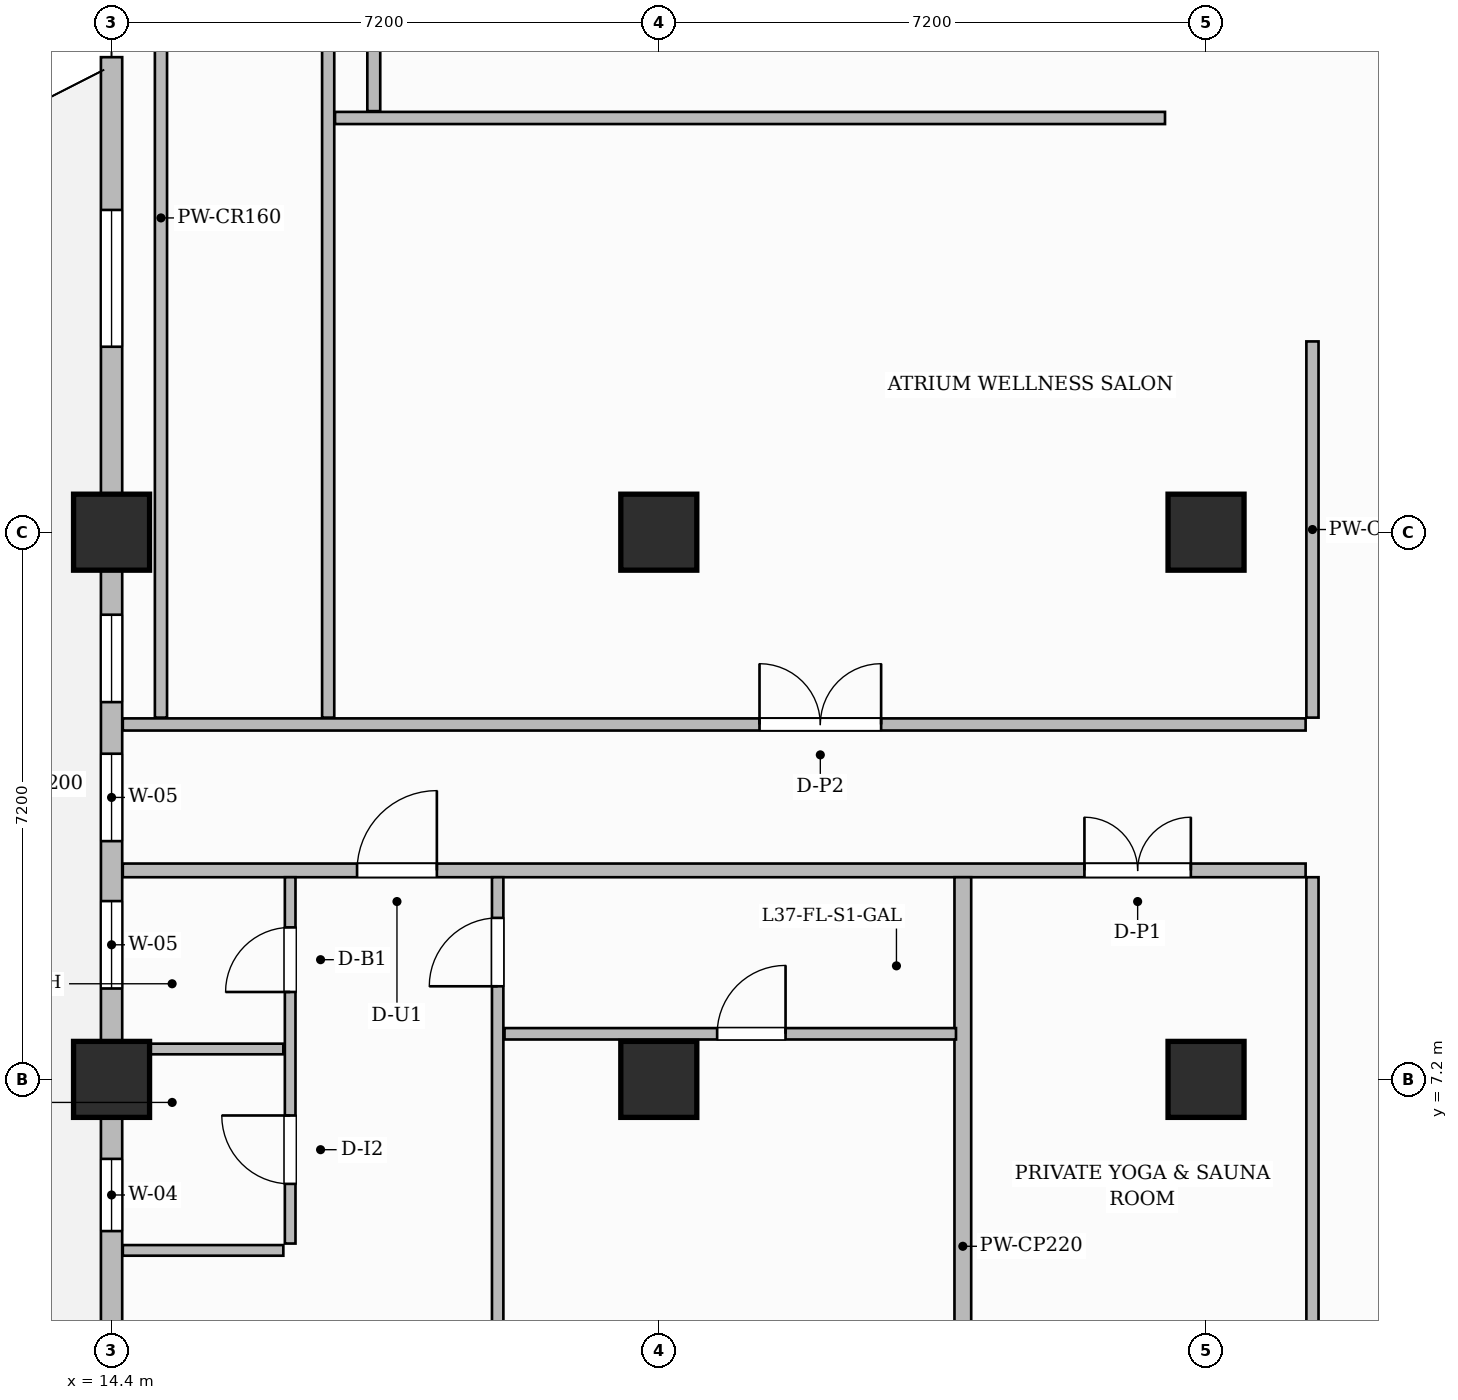
"""IFC4 building model, lengths in metres.
Left out: names, types, materials, properties, quantities, classifications, styles, units other than length and angle.
Written with IfcOpenShell. Run it as: python <this file> out.ifc"""

import sys

from ifc_helpers import new_model, si_unit, direction, frame, frame_2d, origin, origin_2d, place, context, subcontext, project, spatial, rectangle, extrude, source, transform, mapped, element, fill, save


model = new_model("IFC4")
c1 = context("Model", 3, precision=1e-05, world=origin(), true_north=direction((0.0, 1.0)))
c2 = subcontext(c1, "Body", "Model", "MODEL_VIEW")
j1 = project(units=[si_unit("LENGTHUNIT", "METRE"), si_unit("PLANEANGLEUNIT", "RADIAN")], contexts=[c1])
p1 = place(None, origin())
s1 = spatial("IfcSite", under=j1, at=p1, CompositionType="ELEMENT")
p2 = place(p1, origin())
s2 = spatial("IfcBuilding", under=s1, at=p2, CompositionType="ELEMENT")
p3 = place(p2, frame((0.0, 0.0, 150.3)))
s3 = spatial("IfcBuildingStorey", under=s2, at=p3, CompositionType="ELEMENT", Elevation=150.3)
m1 = source(origin(), c2, "Body", "SweptSolid", [
    extrude(rectangle(XDim=1.0, YDim=1.0, at=origin_2d()), origin(), (0.0, 0.0, 1.0), 3.85),
])
for number, where, z_axis, x_axis in (
    (1, (14.4, 7.2, 0.0), (0.0, 0.0, 1.0), (1.0, 0.0, 0.0)),
    (2, (14.4, 14.4, 0.0), (0.0, 0.0, 1.0), (1.0, 0.0, 0.0)),
    (3, (21.6, 7.2, 0.0), (0.0, 0.0, 1.0), (1.0, 0.0, 0.0)),
    (4, (21.6, 14.4, 0.0), (0.0, 0.0, 1.0), (1.0, 0.0, 0.0)),
    (5, (28.8, 7.2, 0.0), (0.0, 0.0, 1.0), (1.0, 0.0, 0.0)),
    (6, (28.8, 14.4, 0.0), (0.0, 0.0, 1.0), (1.0, 0.0, 0.0)),
):
    element("IfcColumn", number, at=place(p3, frame(where, z_axis=z_axis, x_axis=x_axis)), inside=s3, PredefinedType="COLUMN", context=c2, shape_type="MappedRepresentation", body=[
        mapped(m1, transform((0.0, 0.0, 0.0), scale=1.0)),
    ])
p4 = place(p3, frame((14.548, 9.95, 0.0), z_axis=(0.0, 0.0, 1.0), x_axis=(1.0, 0.0, 0.0)))
e7 = element("IfcWall", 7, at=p4, inside=s3, PredefinedType="PARTITIONING", context=c2, shape_type="SweptSolid", body=[
    extrude(rectangle(XDim=15.562, YDim=0.18, at=frame_2d((7.781, 0.0))), origin(), (0.0, 0.0, 1.0), 3.6),
])
p5 = place(p4, frame((3.082, 0.0, 0.0)))
e8 = element("IfcOpeningElement", 8, at=p5, cuts=e7, PredefinedType="OPENING", context=c2, shape_type="SweptSolid", body=[
    extrude(rectangle(XDim=1.05, YDim=2.25, at=frame_2d((0.525, 1.125))), frame((0.0, 0.1, 0.0), z_axis=(0.0, -1.0, 0.0), x_axis=(1.0, 0.0, 0.0)), (0.0, 0.0, 1.0), 0.2),
])
p6 = place(p4, frame((12.652, 0.0, 0.0)))
e9 = element("IfcOpeningElement", 9, at=p6, cuts=e7, PredefinedType="OPENING", context=c2, shape_type="SweptSolid", body=[
    extrude(rectangle(XDim=1.4, YDim=2.35, at=frame_2d((0.7, 1.175))), frame((0.0, 0.1, 0.0), z_axis=(0.0, -1.0, 0.0), x_axis=(1.0, 0.0, 0.0)), (0.0, 0.0, 1.0), 0.2),
])
p7 = place(p3, frame((14.548, 11.87, 0.0), z_axis=(0.0, 0.0, 1.0), x_axis=(1.0, 0.0, 0.0)))
e10 = element("IfcWall", 10, at=p7, inside=s3, PredefinedType="PARTITIONING", context=c2, shape_type="SweptSolid", body=[
    extrude(rectangle(XDim=15.562, YDim=0.16, at=frame_2d((7.781, 0.0))), origin(), (0.0, 0.0, 1.0), 3.6),
])
p8 = place(p7, frame((8.377, 0.0, 0.0)))
e11 = element("IfcOpeningElement", 11, at=p8, cuts=e10, PredefinedType="OPENING", context=c2, shape_type="SweptSolid", body=[
    extrude(rectangle(XDim=1.6, YDim=2.4, at=frame_2d((0.8, 1.2))), frame((0.0, 0.09, 0.0), z_axis=(0.0, -1.0, 0.0), x_axis=(1.0, 0.0, 0.0)), (0.0, 0.0, 1.0), 0.18),
])
p9 = place(p3, frame((30.2, 11.96, 0.0), z_axis=(0.0, 0.0, 1.0), x_axis=(0.0, 1.0, 0.0)))
e12 = element("IfcWall", 12, at=p9, inside=s3, PredefinedType="PARTITIONING", context=c2, shape_type="SweptSolid", body=[
    extrude(rectangle(XDim=4.95, YDim=0.16, at=frame_2d((2.475, 0.0))), origin(), (0.0, 0.0, 1.0), 3.6),
])
p10 = place(p3, frame((30.2, 0.148, 0.0), z_axis=(0.0, 0.0, 1.0), x_axis=(0.0, 1.0, 0.0)))
e13 = element("IfcWall", 13, at=p10, inside=s3, PredefinedType="PARTITIONING", context=c2, shape_type="SweptSolid", body=[
    extrude(rectangle(XDim=9.712, YDim=0.16, at=frame_2d((4.856, 0.0))), origin(), (0.0, 0.0, 1.0), 3.6),
])
p11 = place(p10, frame((1.977, 0.0, 0.0)))
e14 = element("IfcOpeningElement", 14, at=p11, cuts=e13, PredefinedType="OPENING", context=c2, shape_type="SweptSolid", body=[
    extrude(rectangle(XDim=1.05, YDim=2.15, at=frame_2d((0.525, 1.075))), frame((0.0, 0.09, 0.0), z_axis=(0.0, -1.0, 0.0), x_axis=(1.0, 0.0, 0.0)), (0.0, 0.0, 1.0), 0.18),
])
p12 = place(p3, frame((25.6, 0.148, 0.0), z_axis=(0.0, 0.0, 1.0), x_axis=(0.0, 1.0, 0.0)))
e15 = element("IfcWall", 15, at=p12, inside=s3, PredefinedType="PARTITIONING", context=c2, shape_type="SweptSolid", body=[
    extrude(rectangle(XDim=9.712, YDim=0.22, at=frame_2d((4.856, 0.0))), origin(), (0.0, 0.0, 1.0), 3.6),
])
p13 = place(p3, frame((16.75, 5.04, 0.0), z_axis=(0.0, 0.0, 1.0), x_axis=(0.0, 1.0, 0.0)))
e16 = element("IfcWall", 16, at=p13, inside=s3, PredefinedType="PARTITIONING", context=c2, shape_type="SweptSolid", body=[
    extrude(rectangle(XDim=4.82, YDim=0.14, at=frame_2d((2.41, 0.0))), origin(), (0.0, 0.0, 1.0), 3.6),
])
p14 = place(p13, frame((0.785, 0.0, 0.0)))
e17 = element("IfcOpeningElement", 17, at=p14, cuts=e16, PredefinedType="OPENING", context=c2, shape_type="SweptSolid", body=[
    extrude(rectangle(XDim=0.9, YDim=2.15, at=frame_2d((0.45, 1.075))), frame((0.0, 0.08, 0.0), z_axis=(0.0, -1.0, 0.0), x_axis=(1.0, 0.0, 0.0)), (0.0, 0.0, 1.0), 0.16),
])
p15 = place(p13, frame((3.31, 0.0, 0.0)))
e18 = element("IfcOpeningElement", 18, at=p15, cuts=e16, PredefinedType="OPENING", context=c2, shape_type="SweptSolid", body=[
    extrude(rectangle(XDim=0.85, YDim=2.1, at=frame_2d((0.425, 1.05))), frame((0.0, 0.08, 0.0), z_axis=(0.0, -1.0, 0.0), x_axis=(1.0, 0.0, 0.0)), (0.0, 0.0, 1.0), 0.16),
])
p16 = place(p3, frame((14.59, 7.6, 0.0), z_axis=(0.0, 0.0, 1.0), x_axis=(1.0, 0.0, 0.0)))
e19 = element("IfcWall", 19, at=p16, inside=s3, PredefinedType="PARTITIONING", context=c2, shape_type="SweptSolid", body=[
    extrude(rectangle(XDim=2.07, YDim=0.14, at=frame_2d((1.035, 0.0))), origin(), (0.0, 0.0, 1.0), 3.6),
])
p17 = place(p3, frame((14.548, 4.95, 0.0), z_axis=(0.0, 0.0, 1.0), x_axis=(1.0, 0.0, 0.0)))
e20 = element("IfcWall", 20, at=p17, inside=s3, PredefinedType="PARTITIONING", context=c2, shape_type="SweptSolid", body=[
    extrude(rectangle(XDim=2.112, YDim=0.14, at=frame_2d((1.056, 0.0))), origin(), (0.0, 0.0, 1.0), 3.6),
])
p18 = place(p3, frame((19.48, 0.148, 0.0), z_axis=(0.0, 0.0, 1.0), x_axis=(0.0, 1.0, 0.0)))
e21 = element("IfcWall", 21, at=p18, inside=s3, PredefinedType="PARTITIONING", context=c2, shape_type="SweptSolid", body=[
    extrude(rectangle(XDim=9.712, YDim=0.15, at=frame_2d((4.856, 0.0))), origin(), (0.0, 0.0, 1.0), 3.6),
])
p19 = place(p18, frame((8.277, 0.0, 0.0)))
e22 = element("IfcOpeningElement", 22, at=p19, cuts=e21, PredefinedType="OPENING", context=c2, shape_type="SweptSolid", body=[
    extrude(rectangle(XDim=0.9, YDim=2.15, at=frame_2d((0.45, 1.075))), frame((0.0, 0.085, 0.0), z_axis=(0.0, -1.0, 0.0), x_axis=(1.0, 0.0, 0.0)), (0.0, 0.0, 1.0), 0.17),
])
p20 = place(p3, frame((19.57, 7.8, 0.0), z_axis=(0.0, 0.0, 1.0), x_axis=(1.0, 0.0, 0.0)))
e23 = element("IfcWall", 23, at=p20, inside=s3, PredefinedType="PARTITIONING", context=c2, shape_type="SweptSolid", body=[
    extrude(rectangle(XDim=5.94, YDim=0.15, at=frame_2d((2.97, 0.0))), origin(), (0.0, 0.0, 1.0), 3.6),
])
p21 = place(p20, frame((2.798, 0.0, 0.0)))
e24 = element("IfcOpeningElement", 24, at=p21, cuts=e23, PredefinedType="OPENING", context=c2, shape_type="SweptSolid", body=[
    extrude(rectangle(XDim=0.9, YDim=2.15, at=frame_2d((0.45, 1.075))), frame((0.0, 0.085, 0.0), z_axis=(0.0, -1.0, 0.0), x_axis=(1.0, 0.0, 0.0)), (0.0, 0.0, 1.0), 0.17),
])
for number, where, z_axis, x_axis in (
    (25, (15.05, 11.96, 0.0), (0.0, 0.0, 1.0), (0.0, 1.0, 0.0)),
    (26, (17.25, 11.96, 0.0), (0.0, 0.0, 1.0), (0.0, 1.0, 0.0)),
):
    element("IfcWall", number, at=place(p3, frame(where, z_axis=z_axis, x_axis=x_axis)), inside=s3, PredefinedType="PARTITIONING", context=c2, shape_type="SweptSolid", body=[
        extrude(rectangle(XDim=13.15, YDim=0.16, at=frame_2d((6.575, 0.0))), origin(), (0.0, 0.0, 1.0), 3.6),
    ])
p22 = place(p3, frame((17.85, 19.94, 0.0), z_axis=(0.0, 0.0, 1.0), x_axis=(0.0, 1.0, 0.0)))
e27 = element("IfcWall", 27, at=p22, inside=s3, PredefinedType="PARTITIONING", context=c2, shape_type="SweptSolid", body=[
    extrude(rectangle(XDim=5.22, YDim=0.17, at=frame_2d((2.61, 0.0))), origin(), (0.0, 0.0, 1.0), 3.285),
])
p23 = place(p3, frame((17.34, 19.85, 0.0), z_axis=(0.0, 0.0, 1.0), x_axis=(1.0, 0.0, 0.0)))
e28 = element("IfcWall", 28, at=p23, inside=s3, PredefinedType="PARTITIONING", context=c2, shape_type="SweptSolid", body=[
    extrude(rectangle(XDim=10.92, YDim=0.16, at=frame_2d((5.46, 0.0))), origin(), (0.0, 0.0, 1.0), 3.6),
])
p24 = place(p3, frame((14.4, 0.05, 0.0), z_axis=(0.0, 0.0, 1.0), x_axis=(0.0, 1.0, 0.0)))
e29 = element("IfcWall", 29, at=p24, inside=s3, PredefinedType="SOLIDWALL", context=c2, shape_type="SweptSolid", body=[
    extrude(rectangle(XDim=20.6, YDim=0.28, at=frame_2d((10.3, 0.0))), origin(), (0.0, 0.0, 1.0), 3.085),
])
p25 = place(p24, frame((2.75, 0.0, 0.0)))
e30 = element("IfcOpeningElement", 30, at=p25, cuts=e29, PredefinedType="OPENING", context=c2, shape_type="SweptSolid", body=[
    extrude(rectangle(XDim=1.2, YDim=2.2, at=frame_2d((0.6, 1.1))), frame((0.0, 0.15, 0.0), z_axis=(0.0, -1.0, 0.0), x_axis=(1.0, 0.0, 0.0)), (0.0, 0.0, 1.0), 0.3),
])
p26 = place(p24, frame((1.025, 0.0, 0.8)))
e31 = element("IfcOpeningElement", 31, at=p26, cuts=e29, PredefinedType="OPENING", context=c2, shape_type="SweptSolid", body=[
    extrude(rectangle(XDim=1.15, YDim=1.8, at=frame_2d((0.575, 0.9))), frame((0.0, 0.15, 0.0), z_axis=(0.0, -1.0, 0.0), x_axis=(1.0, 0.0, 0.0)), (0.0, 0.0, 1.0), 0.3),
])
p27 = place(p24, frame((5.154, 0.0, 0.8)))
e32 = element("IfcOpeningElement", 32, at=p27, cuts=e29, PredefinedType="OPENING", context=c2, shape_type="SweptSolid", body=[
    extrude(rectangle(XDim=0.95, YDim=1.75, at=frame_2d((0.475, 0.875))), frame((0.0, 0.15, 0.0), z_axis=(0.0, -1.0, 0.0), x_axis=(1.0, 0.0, 0.0)), (0.0, 0.0, 1.0), 0.3),
])
p28 = place(p24, frame((8.346, 0.0, 0.8)))
e33 = element("IfcOpeningElement", 33, at=p28, cuts=e29, PredefinedType="OPENING", context=c2, shape_type="SweptSolid", body=[
    extrude(rectangle(XDim=1.15, YDim=1.8, at=frame_2d((0.575, 0.9))), frame((0.0, 0.15, 0.0), z_axis=(0.0, -1.0, 0.0), x_axis=(1.0, 0.0, 0.0)), (0.0, 0.0, 1.0), 0.3),
])
p29 = place(p24, frame((10.285, 0.0, 0.8)))
e34 = element("IfcOpeningElement", 34, at=p29, cuts=e29, PredefinedType="OPENING", context=c2, shape_type="SweptSolid", body=[
    extrude(rectangle(XDim=1.15, YDim=1.8, at=frame_2d((0.575, 0.9))), frame((0.0, 0.15, 0.0), z_axis=(0.0, -1.0, 0.0), x_axis=(1.0, 0.0, 0.0)), (0.0, 0.0, 1.0), 0.3),
])
p30 = place(p24, frame((12.114, 0.0, 0.8)))
e35 = element("IfcOpeningElement", 35, at=p30, cuts=e29, PredefinedType="OPENING", context=c2, shape_type="SweptSolid", body=[
    extrude(rectangle(XDim=1.15, YDim=1.8, at=frame_2d((0.575, 0.9))), frame((0.0, 0.15, 0.0), z_axis=(0.0, -1.0, 0.0), x_axis=(1.0, 0.0, 0.0)), (0.0, 0.0, 1.0), 0.3),
])
p31 = place(p24, frame((16.79, 0.0, 0.8)))
e36 = element("IfcOpeningElement", 36, at=p31, cuts=e29, PredefinedType="OPENING", context=c2, shape_type="SweptSolid", body=[
    extrude(rectangle(XDim=1.8, YDim=1.85, at=frame_2d((0.9, 0.925))), frame((0.0, 0.15, 0.0), z_axis=(0.0, -1.0, 0.0), x_axis=(1.0, 0.0, 0.0)), (0.0, 0.0, 1.0), 0.3),
])
m2 = source(origin(), c2, "Body", "SweptSolid", [
    extrude(rectangle(XDim=0.9, YDim=2.15, at=frame_2d((0.45, 1.075))), frame((0.0, 0.025, 0.0), z_axis=(0.0, -1.0, 0.0), x_axis=(1.0, 0.0, 0.0)), (0.0, 0.0, 1.0), 0.05),
])
p32 = place(p14, origin())
e37 = element("IfcDoor", 37, at=p32, inside=s3, OperationType="SINGLE_SWING_RIGHT", PredefinedType="DOOR", context=c2, shape_type="MappedRepresentation", body=[
    mapped(m2, transform((0.0, 0.0, 0.0), scale=1.0)),
])
fill(e17, e37)
m3 = source(origin(), c2, "Body", "SweptSolid", [
    extrude(rectangle(XDim=0.85, YDim=2.1, at=frame_2d((0.425, 1.05))), frame((0.0, 0.025, 0.0), z_axis=(0.0, -1.0, 0.0), x_axis=(1.0, 0.0, 0.0)), (0.0, 0.0, 1.0), 0.05),
])
p33 = place(p15, origin())
e38 = element("IfcDoor", 38, at=p33, inside=s3, OperationType="SINGLE_SWING_LEFT", PredefinedType="DOOR", context=c2, shape_type="MappedRepresentation", body=[
    mapped(m3, transform((0.0, 0.0, 0.0), scale=1.0)),
])
fill(e18, e38)
m4 = source(origin(), c2, "Body", "SweptSolid", [
    extrude(rectangle(XDim=1.05, YDim=2.25, at=frame_2d((0.525, 1.125))), frame((0.0, 0.025, 0.0), z_axis=(0.0, -1.0, 0.0), x_axis=(1.0, 0.0, 0.0)), (0.0, 0.0, 1.0), 0.05),
])
p34 = place(p5, origin())
e39 = element("IfcDoor", 39, at=p34, inside=s3, OperationType="SINGLE_SWING_RIGHT", PredefinedType="DOOR", context=c2, shape_type="MappedRepresentation", body=[
    mapped(m4, transform((0.0, 0.0, 0.0), scale=1.0)),
])
fill(e8, e39)
p35 = place(p19, origin())
e40 = element("IfcDoor", 40, at=p35, inside=s3, OperationType="SINGLE_SWING_LEFT", PredefinedType="DOOR", context=c2, shape_type="MappedRepresentation", body=[
    mapped(m2, transform((0.0, 0.0, 0.0), scale=1.0)),
])
fill(e22, e40)
p36 = place(p21, origin())
e41 = element("IfcDoor", 41, at=p36, inside=s3, OperationType="SINGLE_SWING_RIGHT", PredefinedType="DOOR", context=c2, shape_type="MappedRepresentation", body=[
    mapped(m2, transform((0.0, 0.0, 0.0), scale=1.0)),
])
fill(e24, e41)
m5 = source(origin(), c2, "Body", "SweptSolid", [
    extrude(rectangle(XDim=1.4, YDim=2.35, at=frame_2d((0.7, 1.175))), frame((0.0, 0.025, 0.0), z_axis=(0.0, -1.0, 0.0), x_axis=(1.0, 0.0, 0.0)), (0.0, 0.0, 1.0), 0.05),
])
p37 = place(p6, origin())
e42 = element("IfcDoor", 42, at=p37, inside=s3, OperationType="DOUBLE_DOOR_SINGLE_SWING", PredefinedType="DOOR", context=c2, shape_type="MappedRepresentation", body=[
    mapped(m5, transform((0.0, 0.0, 0.0), scale=1.0)),
])
fill(e9, e42)
m6 = source(origin(), c2, "Body", "SweptSolid", [
    extrude(rectangle(XDim=1.6, YDim=2.4, at=frame_2d((0.8, 1.2))), frame((0.0, 0.025, 0.0), z_axis=(0.0, -1.0, 0.0), x_axis=(1.0, 0.0, 0.0)), (0.0, 0.0, 1.0), 0.05),
])
p38 = place(p8, origin())
e43 = element("IfcDoor", 43, at=p38, inside=s3, OperationType="DOUBLE_DOOR_SINGLE_SWING", PredefinedType="DOOR", context=c2, shape_type="MappedRepresentation", body=[
    mapped(m6, transform((0.0, 0.0, 0.0), scale=1.0)),
])
fill(e11, e43)
m7 = source(origin(), c2, "Body", "SweptSolid", [
    extrude(rectangle(XDim=0.95, YDim=1.75, at=frame_2d((0.475, 0.875))), frame((0.0, 0.03, 0.0), z_axis=(0.0, -1.0, 0.0), x_axis=(1.0, 0.0, 0.0)), (0.0, 0.0, 1.0), 0.06),
])
p39 = place(p27, origin())
e44 = element("IfcWindow", 44, at=p39, inside=s3, PartitioningType="SINGLE_PANEL", PredefinedType="WINDOW", context=c2, shape_type="MappedRepresentation", body=[
    mapped(m7, transform((0.0, 0.0, 0.0), scale=1.0)),
])
fill(e32, e44)
m8 = source(origin(), c2, "Body", "SweptSolid", [
    extrude(rectangle(XDim=1.15, YDim=1.8, at=frame_2d((0.575, 0.9))), frame((0.0, 0.03, 0.0), z_axis=(0.0, -1.0, 0.0), x_axis=(1.0, 0.0, 0.0)), (0.0, 0.0, 1.0), 0.06),
])
p40 = place(p28, origin())
e45 = element("IfcWindow", 45, at=p40, inside=s3, PartitioningType="SINGLE_PANEL", PredefinedType="WINDOW", context=c2, shape_type="MappedRepresentation", body=[
    mapped(m8, transform((0.0, 0.0, 0.0), scale=1.0)),
])
fill(e33, e45)
p41 = place(p29, origin())
e46 = element("IfcWindow", 46, at=p41, inside=s3, PartitioningType="SINGLE_PANEL", PredefinedType="WINDOW", context=c2, shape_type="MappedRepresentation", body=[
    mapped(m8, transform((0.0, 0.0, 0.0), scale=1.0)),
])
fill(e34, e46)
p42 = place(p30, origin())
e47 = element("IfcWindow", 47, at=p42, inside=s3, PartitioningType="SINGLE_PANEL", PredefinedType="WINDOW", context=c2, shape_type="MappedRepresentation", body=[
    mapped(m8, transform((0.0, 0.0, 0.0), scale=1.0)),
])
fill(e35, e47)
m9 = source(origin(), c2, "Body", "SweptSolid", [
    extrude(rectangle(XDim=1.8, YDim=1.85, at=frame_2d((0.9, 0.925))), frame((0.0, 0.03, 0.0), z_axis=(0.0, -1.0, 0.0), x_axis=(1.0, 0.0, 0.0)), (0.0, 0.0, 1.0), 0.06),
])
p43 = place(p31, origin())
e48 = element("IfcWindow", 48, at=p43, inside=s3, PartitioningType="DOUBLE_PANEL_VERTICAL", PredefinedType="WINDOW", context=c2, shape_type="MappedRepresentation", body=[
    mapped(m9, transform((0.0, 0.0, 0.0), scale=1.0)),
])
fill(e36, e48)
save(model, sys.argv[1])
